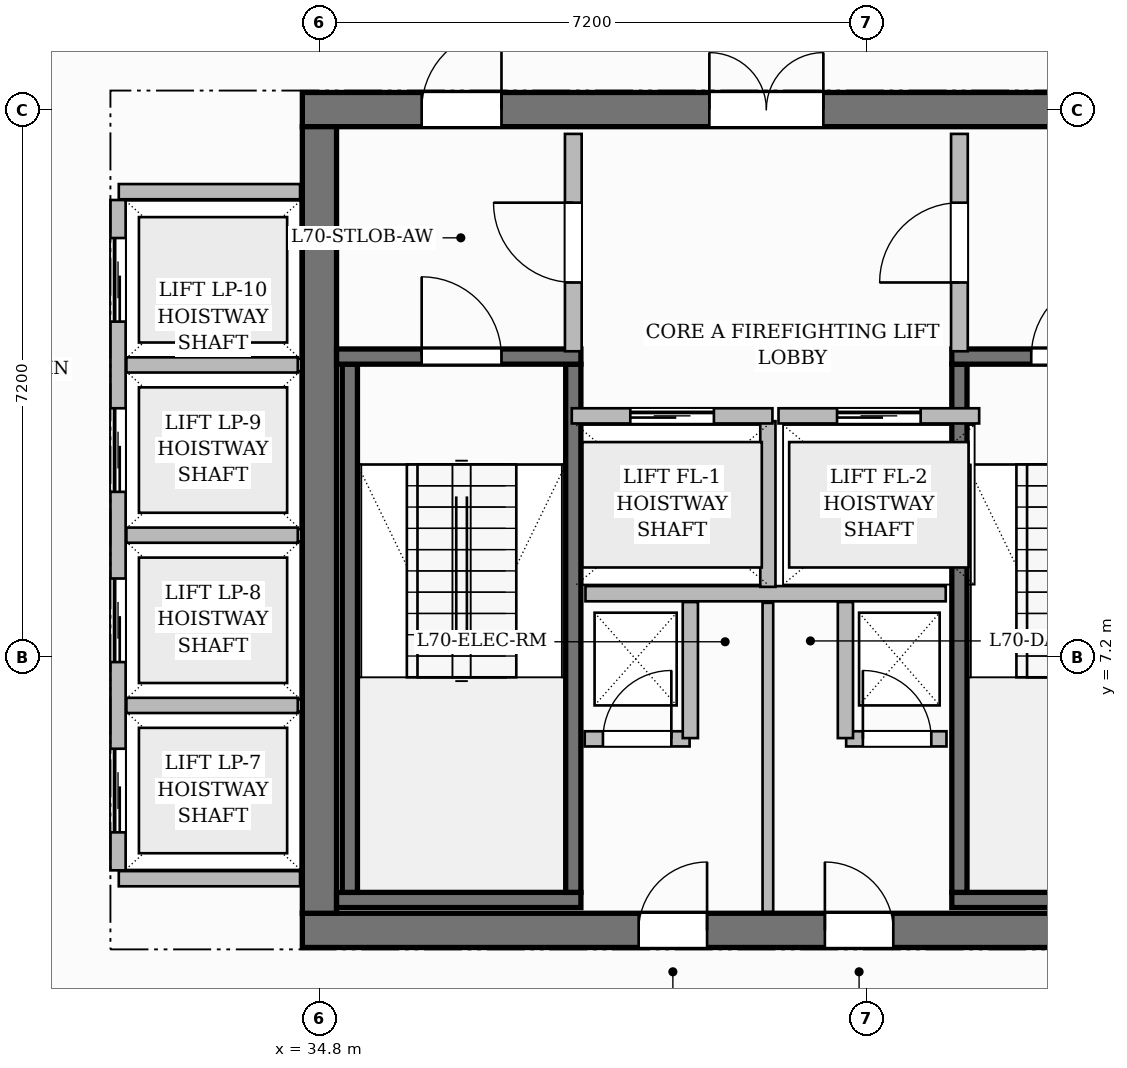
"""IFC4 building model, lengths in metres.
Left out: names, types, materials, properties, quantities, classifications, styles, units other than length and angle.
Written with IfcOpenShell. Run it as: python <this file> out.ifc"""

import sys

from ifc_helpers import new_model, si_unit, direction, frame, frame_2d, origin, place, context, subcontext, project, spatial, rectangle, extrude, source, transform, mapped, element, fill, save


model = new_model("IFC4")
c1 = context("Model", 3, precision=1e-05, world=origin(), true_north=direction((0.0, 1.0)))
c2 = subcontext(c1, "Body", "Model", "MODEL_VIEW")
j1 = project(units=[si_unit("LENGTHUNIT", "METRE"), si_unit("PLANEANGLEUNIT", "RADIAN")], contexts=[c1])
p1 = place(None, origin())
s1 = spatial("IfcSite", under=j1, at=p1, CompositionType="ELEMENT")
p2 = place(p1, origin())
s2 = spatial("IfcBuilding", under=s1, at=p2, CompositionType="ELEMENT")
p3 = place(p2, frame((0.0, 0.0, 278.9)))
s3 = spatial("IfcBuildingStorey", under=s2, at=p3, CompositionType="ELEMENT", Elevation=278.9)
p4 = place(p3, frame((34.575, 3.6, 0.0), z_axis=(0.0, 0.0, 1.0), x_axis=(1.0, 0.0, 0.0)))
e1 = element("IfcWall", 1, at=p4, inside=s3, PredefinedType="SHEAR", context=c2, shape_type="SweptSolid", body=[
    extrude(rectangle(XDim=15.45, YDim=0.45, at=frame_2d((7.725, 0.0))), origin(), (0.0, 0.0, 1.0), 3.85),
])
p5 = place(p4, frame((4.425, 0.0, 0.0)))
e2 = element("IfcOpeningElement", 2, at=p5, cuts=e1, PredefinedType="OPENING", context=c2, shape_type="SweptSolid", body=[
    extrude(rectangle(XDim=0.9, YDim=2.1, at=frame_2d((0.45, 1.05))), frame((0.0, 0.235, 0.0), z_axis=(0.0, -1.0, 0.0), x_axis=(1.0, 0.0, 0.0)), (0.0, 0.0, 1.0), 0.47),
])
p6 = place(p4, frame((6.875, 0.0, 0.0)))
e3 = element("IfcOpeningElement", 3, at=p6, cuts=e1, PredefinedType="OPENING", context=c2, shape_type="SweptSolid", body=[
    extrude(rectangle(XDim=0.9, YDim=2.1, at=frame_2d((0.45, 1.05))), frame((0.0, 0.235, 0.0), z_axis=(0.0, -1.0, 0.0), x_axis=(1.0, 0.0, 0.0)), (0.0, 0.0, 1.0), 0.47),
])
p7 = place(p3, frame((34.575, 14.4, 0.0), z_axis=(0.0, 0.0, 1.0), x_axis=(1.0, 0.0, 0.0)))
e4 = element("IfcWall", 4, at=p7, inside=s3, PredefinedType="SHEAR", context=c2, shape_type="SweptSolid", body=[
    extrude(rectangle(XDim=15.45, YDim=0.45, at=frame_2d((7.725, 0.0))), origin(), (0.0, 0.0, 1.0), 3.85),
])
p8 = place(p7, frame((5.355, 0.0, 0.0)))
e5 = element("IfcOpeningElement", 5, at=p8, cuts=e4, PredefinedType="OPENING", context=c2, shape_type="SweptSolid", body=[
    extrude(rectangle(XDim=1.5, YDim=2.2, at=frame_2d((0.75, 1.1))), frame((0.0, 0.235, 0.0), z_axis=(0.0, -1.0, 0.0), x_axis=(1.0, 0.0, 0.0)), (0.0, 0.0, 1.0), 0.47),
])
p9 = place(p7, frame((1.57, 0.0, 0.0)))
e6 = element("IfcOpeningElement", 6, at=p9, cuts=e4, PredefinedType="OPENING", context=c2, shape_type="SweptSolid", body=[
    extrude(rectangle(XDim=1.05, YDim=2.15, at=frame_2d((0.525, 1.075))), frame((0.0, 0.235, 0.0), z_axis=(0.0, -1.0, 0.0), x_axis=(1.0, 0.0, 0.0)), (0.0, 0.0, 1.0), 0.47),
])
p10 = place(p7, frame((11.2, 0.0, 0.0)))
e7 = element("IfcOpeningElement", 7, at=p10, cuts=e4, PredefinedType="OPENING", context=c2, shape_type="SweptSolid", body=[
    extrude(rectangle(XDim=1.05, YDim=2.15, at=frame_2d((0.525, 1.075))), frame((0.0, 0.235, 0.0), z_axis=(0.0, -1.0, 0.0), x_axis=(1.0, 0.0, 0.0)), (0.0, 0.0, 1.0), 0.47),
])
p11 = place(p3, frame((34.8, 3.825, 0.0), z_axis=(0.0, 0.0, 1.0), x_axis=(0.0, 1.0, 0.0)))
e8 = element("IfcWall", 8, at=p11, inside=s3, PredefinedType="SHEAR", context=c2, shape_type="SweptSolid", body=[
    extrude(rectangle(XDim=10.35, YDim=0.45, at=frame_2d((5.175, 0.0))), origin(), (0.0, 0.0, 1.0), 3.85),
])
p12 = place(p3, frame((35.025, 4.0, 0.0), z_axis=(0.0, 0.0, 1.0), x_axis=(1.0, 0.0, 0.0)))
e9 = element("IfcWall", 9, at=p12, inside=s3, PredefinedType="SHEAR", context=c2, shape_type="SweptSolid", body=[
    extrude(rectangle(XDim=3.215, YDim=0.2, at=frame_2d((1.607, 0.0))), origin(), (0.0, 0.0, 1.0), 3.85),
])
for number, where, z_axis, x_axis in (
    (10, (35.2, 4.1, 0.0), (0.0, 0.0, 1.0), (0.0, 1.0, 0.0)),
    (11, (38.14, 4.1, 0.0), (0.0, 0.0, 1.0), (0.0, 1.0, 0.0)),
):
    element("IfcWall", number, at=place(p3, frame(where, z_axis=z_axis, x_axis=x_axis)), inside=s3, PredefinedType="SHEAR", context=c2, shape_type="SweptSolid", body=[
        extrude(rectangle(XDim=6.95, YDim=0.2, at=frame_2d((3.475, 0.0))), origin(), (0.0, 0.0, 1.0), 3.85),
    ])
p13 = place(p3, frame((35.025, 11.15, 0.0), z_axis=(0.0, 0.0, 1.0), x_axis=(1.0, 0.0, 0.0)))
e12 = element("IfcWall", 12, at=p13, inside=s3, PredefinedType="SHEAR", context=c2, shape_type="SweptSolid", body=[
    extrude(rectangle(XDim=3.215, YDim=0.2, at=frame_2d((1.607, 0.0))), origin(), (0.0, 0.0, 1.0), 3.85),
])
p14 = place(p13, frame((1.12, 0.0, 0.0)))
e13 = element("IfcOpeningElement", 13, at=p14, cuts=e12, PredefinedType="OPENING", context=c2, shape_type="SweptSolid", body=[
    extrude(rectangle(XDim=1.05, YDim=2.2, at=frame_2d((0.525, 1.1))), frame((0.0, 0.11, 0.0), z_axis=(0.0, -1.0, 0.0), x_axis=(1.0, 0.0, 0.0)), (0.0, 0.0, 1.0), 0.22),
])
p15 = place(p3, frame((43.12, 4.0, 0.0), z_axis=(0.0, 0.0, 1.0), x_axis=(1.0, 0.0, 0.0)))
e14 = element("IfcWall", 14, at=p15, inside=s3, PredefinedType="SHEAR", context=c2, shape_type="SweptSolid", body=[
    extrude(rectangle(XDim=6.455, YDim=0.2, at=frame_2d((3.228, 0.0))), origin(), (0.0, 0.0, 1.0), 3.85),
])
p16 = place(p3, frame((43.22, 4.1, 0.0), z_axis=(0.0, 0.0, 1.0), x_axis=(0.0, 1.0, 0.0)))
e15 = element("IfcWall", 15, at=p16, inside=s3, PredefinedType="SHEAR", context=c2, shape_type="SweptSolid", body=[
    extrude(rectangle(XDim=6.95, YDim=0.2, at=frame_2d((3.475, 0.0))), origin(), (0.0, 0.0, 1.0), 3.85),
])
p17 = place(p3, frame((43.12, 11.15, 0.0), z_axis=(0.0, 0.0, 1.0), x_axis=(1.0, 0.0, 0.0)))
e16 = element("IfcWall", 16, at=p17, inside=s3, PredefinedType="SHEAR", context=c2, shape_type="SweptSolid", body=[
    extrude(rectangle(XDim=6.455, YDim=0.2, at=frame_2d((3.228, 0.0))), origin(), (0.0, 0.0, 1.0), 3.85),
])
p18 = place(p17, frame((1.045, 0.0, 0.0)))
e17 = element("IfcOpeningElement", 17, at=p18, cuts=e16, PredefinedType="OPENING", context=c2, shape_type="SweptSolid", body=[
    extrude(rectangle(XDim=1.05, YDim=2.2, at=frame_2d((0.525, 1.1))), frame((0.0, 0.11, 0.0), z_axis=(0.0, -1.0, 0.0), x_axis=(1.0, 0.0, 0.0)), (0.0, 0.0, 1.0), 0.22),
])
p19 = place(p17, frame((4.125, 0.0, 0.0)))
e18 = element("IfcOpeningElement", 18, at=p19, cuts=e16, PredefinedType="OPENING", context=c2, shape_type="SweptSolid", body=[
    extrude(rectangle(XDim=1.05, YDim=2.2, at=frame_2d((0.525, 1.1))), frame((0.0, 0.11, 0.0), z_axis=(0.0, -1.0, 0.0), x_axis=(1.0, 0.0, 0.0)), (0.0, 0.0, 1.0), 0.22),
])
p20 = place(p3, frame((38.3, 8.03, 0.0), z_axis=(0.0, 0.0, 1.0), x_axis=(1.0, 0.0, 0.0)))
e19 = element("IfcWall", 19, at=p20, inside=s3, PredefinedType="PARTITIONING", context=c2, shape_type="SweptSolid", body=[
    extrude(rectangle(XDim=4.74, YDim=0.2, at=frame_2d((2.37, 0.0))), origin(), (0.0, 0.0, 1.0), 3.6),
])
p21 = place(p3, frame((40.7, 8.12, 0.0), z_axis=(0.0, 0.0, 1.0), x_axis=(0.0, 1.0, 0.0)))
e20 = element("IfcWall", 20, at=p21, inside=s3, PredefinedType="PARTITIONING", context=c2, shape_type="SweptSolid", body=[
    extrude(rectangle(XDim=2.18, YDim=0.2, at=frame_2d((1.09, 0.0))), origin(), (0.0, 0.0, 1.0), 3.6),
])
p22 = place(p3, frame((38.14, 11.22, 0.0), z_axis=(0.0, 0.0, 1.0), x_axis=(0.0, 1.0, 0.0)))
e21 = element("IfcWall", 21, at=p22, inside=s3, PredefinedType="PARTITIONING", context=c2, shape_type="SweptSolid", body=[
    extrude(rectangle(XDim=2.86, YDim=0.22, at=frame_2d((1.43, 0.0))), origin(), (0.0, 0.0, 1.0), 3.6),
])
p23 = place(p22, frame((0.905, 0.0, 0.0)))
e22 = element("IfcOpeningElement", 22, at=p23, cuts=e21, PredefinedType="OPENING", context=c2, shape_type="SweptSolid", body=[
    extrude(rectangle(XDim=1.05, YDim=2.15, at=frame_2d((0.525, 1.075))), frame((0.0, 0.12, 0.0), z_axis=(0.0, -1.0, 0.0), x_axis=(1.0, 0.0, 0.0)), (0.0, 0.0, 1.0), 0.24),
])
p24 = place(p3, frame((43.22, 11.22, 0.0), z_axis=(0.0, 0.0, 1.0), x_axis=(0.0, 1.0, 0.0)))
e23 = element("IfcWall", 23, at=p24, inside=s3, PredefinedType="PARTITIONING", context=c2, shape_type="SweptSolid", body=[
    extrude(rectangle(XDim=2.86, YDim=0.22, at=frame_2d((1.43, 0.0))), origin(), (0.0, 0.0, 1.0), 3.6),
])
p25 = place(p24, frame((0.905, 0.0, 0.0)))
e24 = element("IfcOpeningElement", 24, at=p25, cuts=e23, PredefinedType="OPENING", context=c2, shape_type="SweptSolid", body=[
    extrude(rectangle(XDim=1.05, YDim=2.15, at=frame_2d((0.525, 1.075))), frame((0.0, 0.12, 0.0), z_axis=(0.0, -1.0, 0.0), x_axis=(1.0, 0.0, 0.0)), (0.0, 0.0, 1.0), 0.24),
])
p26 = place(p3, frame((38.29, 6.12, 0.0), z_axis=(0.0, 0.0, 1.0), x_axis=(1.0, 0.0, 0.0)))
e25 = element("IfcWall", 25, at=p26, inside=s3, PredefinedType="PARTITIONING", context=c2, shape_type="SweptSolid", body=[
    extrude(rectangle(XDim=1.38, YDim=0.2, at=frame_2d((0.69, 0.0))), origin(), (0.0, 0.0, 1.0), 3.6),
])
p27 = place(p26, frame((0.24, 0.0, 0.0)))
e26 = element("IfcOpeningElement", 26, at=p27, cuts=e25, PredefinedType="OPENING", context=c2, shape_type="SweptSolid", body=[
    extrude(rectangle(XDim=0.9, YDim=2.1, at=frame_2d((0.45, 1.05))), frame((0.0, 0.11, 0.0), z_axis=(0.0, -1.0, 0.0), x_axis=(1.0, 0.0, 0.0)), (0.0, 0.0, 1.0), 0.22),
])
p28 = place(p3, frame((39.68, 6.13, 0.0), z_axis=(0.0, 0.0, 1.0), x_axis=(0.0, 1.0, 0.0)))
e27 = element("IfcWall", 27, at=p28, inside=s3, PredefinedType="PARTITIONING", context=c2, shape_type="SweptSolid", body=[
    extrude(rectangle(XDim=1.79, YDim=0.2, at=frame_2d((0.895, 0.0))), origin(), (0.0, 0.0, 1.0), 3.6),
])
p29 = place(p3, frame((41.73, 6.12, 0.0), z_axis=(0.0, 0.0, 1.0), x_axis=(1.0, 0.0, 0.0)))
e28 = element("IfcWall", 28, at=p29, inside=s3, PredefinedType="PARTITIONING", context=c2, shape_type="SweptSolid", body=[
    extrude(rectangle(XDim=1.32, YDim=0.2, at=frame_2d((0.66, 0.0))), origin(), (0.0, 0.0, 1.0), 3.6),
])
p30 = place(p29, frame((0.22, 0.0, 0.0)))
e29 = element("IfcOpeningElement", 29, at=p30, cuts=e28, PredefinedType="OPENING", context=c2, shape_type="SweptSolid", body=[
    extrude(rectangle(XDim=0.9, YDim=2.1, at=frame_2d((0.45, 1.05))), frame((0.0, 0.11, 0.0), z_axis=(0.0, -1.0, 0.0), x_axis=(1.0, 0.0, 0.0)), (0.0, 0.0, 1.0), 0.22),
])
p31 = place(p3, frame((41.72, 6.13, 0.0), z_axis=(0.0, 0.0, 1.0), x_axis=(0.0, 1.0, 0.0)))
e30 = element("IfcWall", 30, at=p31, inside=s3, PredefinedType="PARTITIONING", context=c2, shape_type="SweptSolid", body=[
    extrude(rectangle(XDim=1.79, YDim=0.2, at=frame_2d((0.895, 0.0))), origin(), (0.0, 0.0, 1.0), 3.6),
])
p32 = place(p3, frame((40.7, 3.845, 0.0), z_axis=(0.0, 0.0, 1.0), x_axis=(0.0, 1.0, 0.0)))
e31 = element("IfcWall", 31, at=p32, inside=s3, PredefinedType="PARTITIONING", context=c2, shape_type="SweptSolid", body=[
    extrude(rectangle(XDim=4.065, YDim=0.14, at=frame_2d((2.032, 0.0))), origin(), (0.0, 0.0, 1.0), 3.6),
])
for number, where, z_axis, x_axis in (
    (32, (32.16, 4.28, 0.0), (0.0, 0.0, 1.0), (1.0, 0.0, 0.0)),
    (33, (32.16, 13.32, 0.0), (0.0, 0.0, 1.0), (1.0, 0.0, 0.0)),
):
    element("IfcWall", number, at=place(p3, frame(where, z_axis=z_axis, x_axis=x_axis)), inside=s3, PredefinedType="PARTITIONING", context=c2, shape_type="SweptSolid", body=[
        extrude(rectangle(XDim=2.385, YDim=0.2, at=frame_2d((1.192, 0.0))), origin(), (0.0, 0.0, 1.0), 3.6),
    ])
p33 = place(p3, frame((32.15, 4.39, 0.0), z_axis=(0.0, 0.0, 1.0), x_axis=(0.0, 1.0, 0.0)))
e34 = element("IfcWall", 34, at=p33, inside=s3, PredefinedType="PARTITIONING", context=c2, shape_type="SweptSolid", body=[
    extrude(rectangle(XDim=8.82, YDim=0.2, at=frame_2d((4.41, 0.0))), origin(), (0.0, 0.0, 1.0), 3.6),
])
p34 = place(p33, frame((0.5, 0.0, 0.0)))
e35 = element("IfcOpeningElement", 35, at=p34, cuts=e34, PredefinedType="OPENING", context=c2, shape_type="SweptSolid", body=[
    extrude(rectangle(XDim=1.1, YDim=2.2, at=frame_2d((0.55, 1.1))), frame((0.0, 0.11, 0.0), z_axis=(0.0, -1.0, 0.0), x_axis=(1.0, 0.0, 0.0)), (0.0, 0.0, 1.0), 0.22),
])
p35 = place(p33, frame((2.74, 0.0, 0.0)))
e36 = element("IfcOpeningElement", 36, at=p35, cuts=e34, PredefinedType="OPENING", context=c2, shape_type="SweptSolid", body=[
    extrude(rectangle(XDim=1.1, YDim=2.2, at=frame_2d((0.55, 1.1))), frame((0.0, 0.11, 0.0), z_axis=(0.0, -1.0, 0.0), x_axis=(1.0, 0.0, 0.0)), (0.0, 0.0, 1.0), 0.22),
])
p36 = place(p33, frame((4.98, 0.0, 0.0)))
e37 = element("IfcOpeningElement", 37, at=p36, cuts=e34, PredefinedType="OPENING", context=c2, shape_type="SweptSolid", body=[
    extrude(rectangle(XDim=1.1, YDim=2.2, at=frame_2d((0.55, 1.1))), frame((0.0, 0.11, 0.0), z_axis=(0.0, -1.0, 0.0), x_axis=(1.0, 0.0, 0.0)), (0.0, 0.0, 1.0), 0.22),
])
p37 = place(p33, frame((7.22, 0.0, 0.0)))
e38 = element("IfcOpeningElement", 38, at=p37, cuts=e34, PredefinedType="OPENING", context=c2, shape_type="SweptSolid", body=[
    extrude(rectangle(XDim=1.1, YDim=2.2, at=frame_2d((0.55, 1.1))), frame((0.0, 0.11, 0.0), z_axis=(0.0, -1.0, 0.0), x_axis=(1.0, 0.0, 0.0)), (0.0, 0.0, 1.0), 0.22),
])
for number, where, z_axis, x_axis in (
    (39, (32.26, 6.56, 0.0), (0.0, 0.0, 1.0), (1.0, 0.0, 0.0)),
    (40, (32.26, 8.8, 0.0), (0.0, 0.0, 1.0), (1.0, 0.0, 0.0)),
    (41, (32.26, 11.04, 0.0), (0.0, 0.0, 1.0), (1.0, 0.0, 0.0)),
):
    element("IfcWall", number, at=place(p3, frame(where, z_axis=z_axis, x_axis=x_axis)), inside=s3, PredefinedType="PARTITIONING", context=c2, shape_type="SweptSolid", body=[
        extrude(rectangle(XDim=2.255, YDim=0.2, at=frame_2d((1.127, 0.0))), origin(), (0.0, 0.0, 1.0), 3.6),
    ])
p38 = place(p3, frame((38.12, 10.37, 0.0), z_axis=(0.0, 0.0, 1.0), x_axis=(1.0, 0.0, 0.0)))
e42 = element("IfcWall", 42, at=p38, inside=s3, PredefinedType="PARTITIONING", context=c2, shape_type="SweptSolid", body=[
    extrude(rectangle(XDim=2.64, YDim=0.2, at=frame_2d((1.32, 0.0))), origin(), (0.0, 0.0, 1.0), 3.6),
])
p39 = place(p38, frame((0.77, 0.0, 0.0)))
e43 = element("IfcOpeningElement", 43, at=p39, cuts=e42, PredefinedType="OPENING", context=c2, shape_type="SweptSolid", body=[
    extrude(rectangle(XDim=1.1, YDim=2.2, at=frame_2d((0.55, 1.1))), frame((0.0, 0.11, 0.0), z_axis=(0.0, -1.0, 0.0), x_axis=(1.0, 0.0, 0.0)), (0.0, 0.0, 1.0), 0.22),
])
p40 = place(p3, frame((40.84, 10.37, 0.0), z_axis=(0.0, 0.0, 1.0), x_axis=(1.0, 0.0, 0.0)))
e44 = element("IfcWall", 44, at=p40, inside=s3, PredefinedType="PARTITIONING", context=c2, shape_type="SweptSolid", body=[
    extrude(rectangle(XDim=2.64, YDim=0.2, at=frame_2d((1.32, 0.0))), origin(), (0.0, 0.0, 1.0), 3.6),
])
p41 = place(p40, frame((0.77, 0.0, 0.0)))
e45 = element("IfcOpeningElement", 45, at=p41, cuts=e44, PredefinedType="OPENING", context=c2, shape_type="SweptSolid", body=[
    extrude(rectangle(XDim=1.1, YDim=2.2, at=frame_2d((0.55, 1.1))), frame((0.0, 0.11, 0.0), z_axis=(0.0, -1.0, 0.0), x_axis=(1.0, 0.0, 0.0)), (0.0, 0.0, 1.0), 0.22),
])
m1 = source(origin(), c2, "Body", "SweptSolid", [
    extrude(rectangle(XDim=1.05, YDim=2.2, at=frame_2d((0.525, 1.1))), frame((0.0, 0.025, 0.0), z_axis=(0.0, -1.0, 0.0), x_axis=(1.0, 0.0, 0.0)), (0.0, 0.0, 1.0), 0.05),
])
p42 = place(p14, origin())
e46 = element("IfcDoor", 46, at=p42, inside=s3, OperationType="SINGLE_SWING_LEFT", PredefinedType="DOOR", context=c2, shape_type="MappedRepresentation", body=[
    mapped(m1, transform((0.0, 0.0, 0.0), scale=1.0)),
])
fill(e13, e46)
p43 = place(p18, origin())
e47 = element("IfcDoor", 47, at=p43, inside=s3, OperationType="SINGLE_SWING_RIGHT", PredefinedType="DOOR", context=c2, shape_type="MappedRepresentation", body=[
    mapped(m1, transform((0.0, 0.0, 0.0), scale=1.0)),
])
fill(e17, e47)
m2 = source(origin(), c2, "Body", "SweptSolid", [
    extrude(rectangle(XDim=1.05, YDim=2.15, at=frame_2d((0.525, 1.075))), frame((0.0, 0.025, 0.0), z_axis=(0.0, -1.0, 0.0), x_axis=(1.0, 0.0, 0.0)), (0.0, 0.0, 1.0), 0.05),
])
p44 = place(p23, origin())
e48 = element("IfcDoor", 48, at=p44, inside=s3, OperationType="SINGLE_SWING_RIGHT", PredefinedType="DOOR", context=c2, shape_type="MappedRepresentation", body=[
    mapped(m2, transform((0.0, 0.0, 0.0), scale=1.0)),
])
fill(e22, e48)
p45 = place(p25, origin())
e49 = element("IfcDoor", 49, at=p45, inside=s3, OperationType="SINGLE_SWING_LEFT", PredefinedType="DOOR", context=c2, shape_type="MappedRepresentation", body=[
    mapped(m2, transform((0.0, 0.0, 0.0), scale=1.0)),
])
fill(e24, e49)
m3 = source(origin(), c2, "Body", "SweptSolid", [
    extrude(rectangle(XDim=1.5, YDim=2.2, at=frame_2d((0.75, 1.1))), frame((0.0, 0.025, 0.0), z_axis=(0.0, -1.0, 0.0), x_axis=(1.0, 0.0, 0.0)), (0.0, 0.0, 1.0), 0.05),
])
p46 = place(p8, origin())
e50 = element("IfcDoor", 50, at=p46, inside=s3, OperationType="DOUBLE_DOOR_SINGLE_SWING", PredefinedType="DOOR", context=c2, shape_type="MappedRepresentation", body=[
    mapped(m3, transform((0.0, 0.0, 0.0), scale=1.0)),
])
fill(e5, e50)
p47 = place(p9, origin())
e51 = element("IfcDoor", 51, at=p47, inside=s3, OperationType="SINGLE_SWING_RIGHT", PredefinedType="DOOR", context=c2, shape_type="MappedRepresentation", body=[
    mapped(m2, transform((0.0, 0.0, 0.0), scale=1.0)),
])
fill(e6, e51)
m4 = source(origin(), c2, "Body", "SweptSolid", [
    extrude(rectangle(XDim=0.9, YDim=2.1, at=frame_2d((0.45, 1.05))), frame((0.0, 0.025, 0.0), z_axis=(0.0, -1.0, 0.0), x_axis=(1.0, 0.0, 0.0)), (0.0, 0.0, 1.0), 0.05),
])
p48 = place(p27, origin())
e52 = element("IfcDoor", 52, at=p48, inside=s3, OperationType="SINGLE_SWING_RIGHT", PredefinedType="DOOR", context=c2, shape_type="MappedRepresentation", body=[
    mapped(m4, transform((0.0, 0.0, 0.0), scale=1.0)),
])
fill(e26, e52)
p49 = place(p30, origin())
e53 = element("IfcDoor", 53, at=p49, inside=s3, OperationType="SINGLE_SWING_LEFT", PredefinedType="DOOR", context=c2, shape_type="MappedRepresentation", body=[
    mapped(m4, transform((0.0, 0.0, 0.0), scale=1.0)),
])
fill(e29, e53)
p50 = place(p5, origin())
e54 = element("IfcDoor", 54, at=p50, inside=s3, OperationType="SINGLE_SWING_RIGHT", PredefinedType="DOOR", context=c2, shape_type="MappedRepresentation", body=[
    mapped(m4, transform((0.0, 0.0, 0.0), scale=1.0)),
])
fill(e2, e54)
p51 = place(p6, origin())
e55 = element("IfcDoor", 55, at=p51, inside=s3, OperationType="SINGLE_SWING_LEFT", PredefinedType="DOOR", context=c2, shape_type="MappedRepresentation", body=[
    mapped(m4, transform((0.0, 0.0, 0.0), scale=1.0)),
])
fill(e3, e55)
m5 = source(origin(), c2, "Body", "SweptSolid", [
    extrude(rectangle(XDim=1.1, YDim=2.2, at=frame_2d((0.55, 1.1))), frame((0.0, 0.025, 0.0), z_axis=(0.0, -1.0, 0.0), x_axis=(1.0, 0.0, 0.0)), (0.0, 0.0, 1.0), 0.05),
])
p52 = place(p39, origin())
e56 = element("IfcDoor", 56, at=p52, inside=s3, OperationType="SLIDING_TO_LEFT", PredefinedType="DOOR", context=c2, shape_type="MappedRepresentation", body=[
    mapped(m5, transform((0.0, 0.0, 0.0), scale=1.0)),
])
fill(e43, e56)
p53 = place(p41, origin())
e57 = element("IfcDoor", 57, at=p53, inside=s3, OperationType="SLIDING_TO_LEFT", PredefinedType="DOOR", context=c2, shape_type="MappedRepresentation", body=[
    mapped(m5, transform((0.0, 0.0, 0.0), scale=1.0)),
])
fill(e45, e57)
p54 = place(p34, origin())
e58 = element("IfcDoor", 58, at=p54, inside=s3, OperationType="SLIDING_TO_LEFT", PredefinedType="DOOR", context=c2, shape_type="MappedRepresentation", body=[
    mapped(m5, transform((0.0, 0.0, 0.0), scale=1.0)),
])
fill(e35, e58)
p55 = place(p35, origin())
e59 = element("IfcDoor", 59, at=p55, inside=s3, OperationType="SLIDING_TO_LEFT", PredefinedType="DOOR", context=c2, shape_type="MappedRepresentation", body=[
    mapped(m5, transform((0.0, 0.0, 0.0), scale=1.0)),
])
fill(e36, e59)
p56 = place(p36, origin())
e60 = element("IfcDoor", 60, at=p56, inside=s3, OperationType="SLIDING_TO_LEFT", PredefinedType="DOOR", context=c2, shape_type="MappedRepresentation", body=[
    mapped(m5, transform((0.0, 0.0, 0.0), scale=1.0)),
])
fill(e37, e60)
p57 = place(p37, origin())
e61 = element("IfcDoor", 61, at=p57, inside=s3, OperationType="SLIDING_TO_LEFT", PredefinedType="DOOR", context=c2, shape_type="MappedRepresentation", body=[
    mapped(m5, transform((0.0, 0.0, 0.0), scale=1.0)),
])
fill(e38, e61)
save(model, sys.argv[1])
